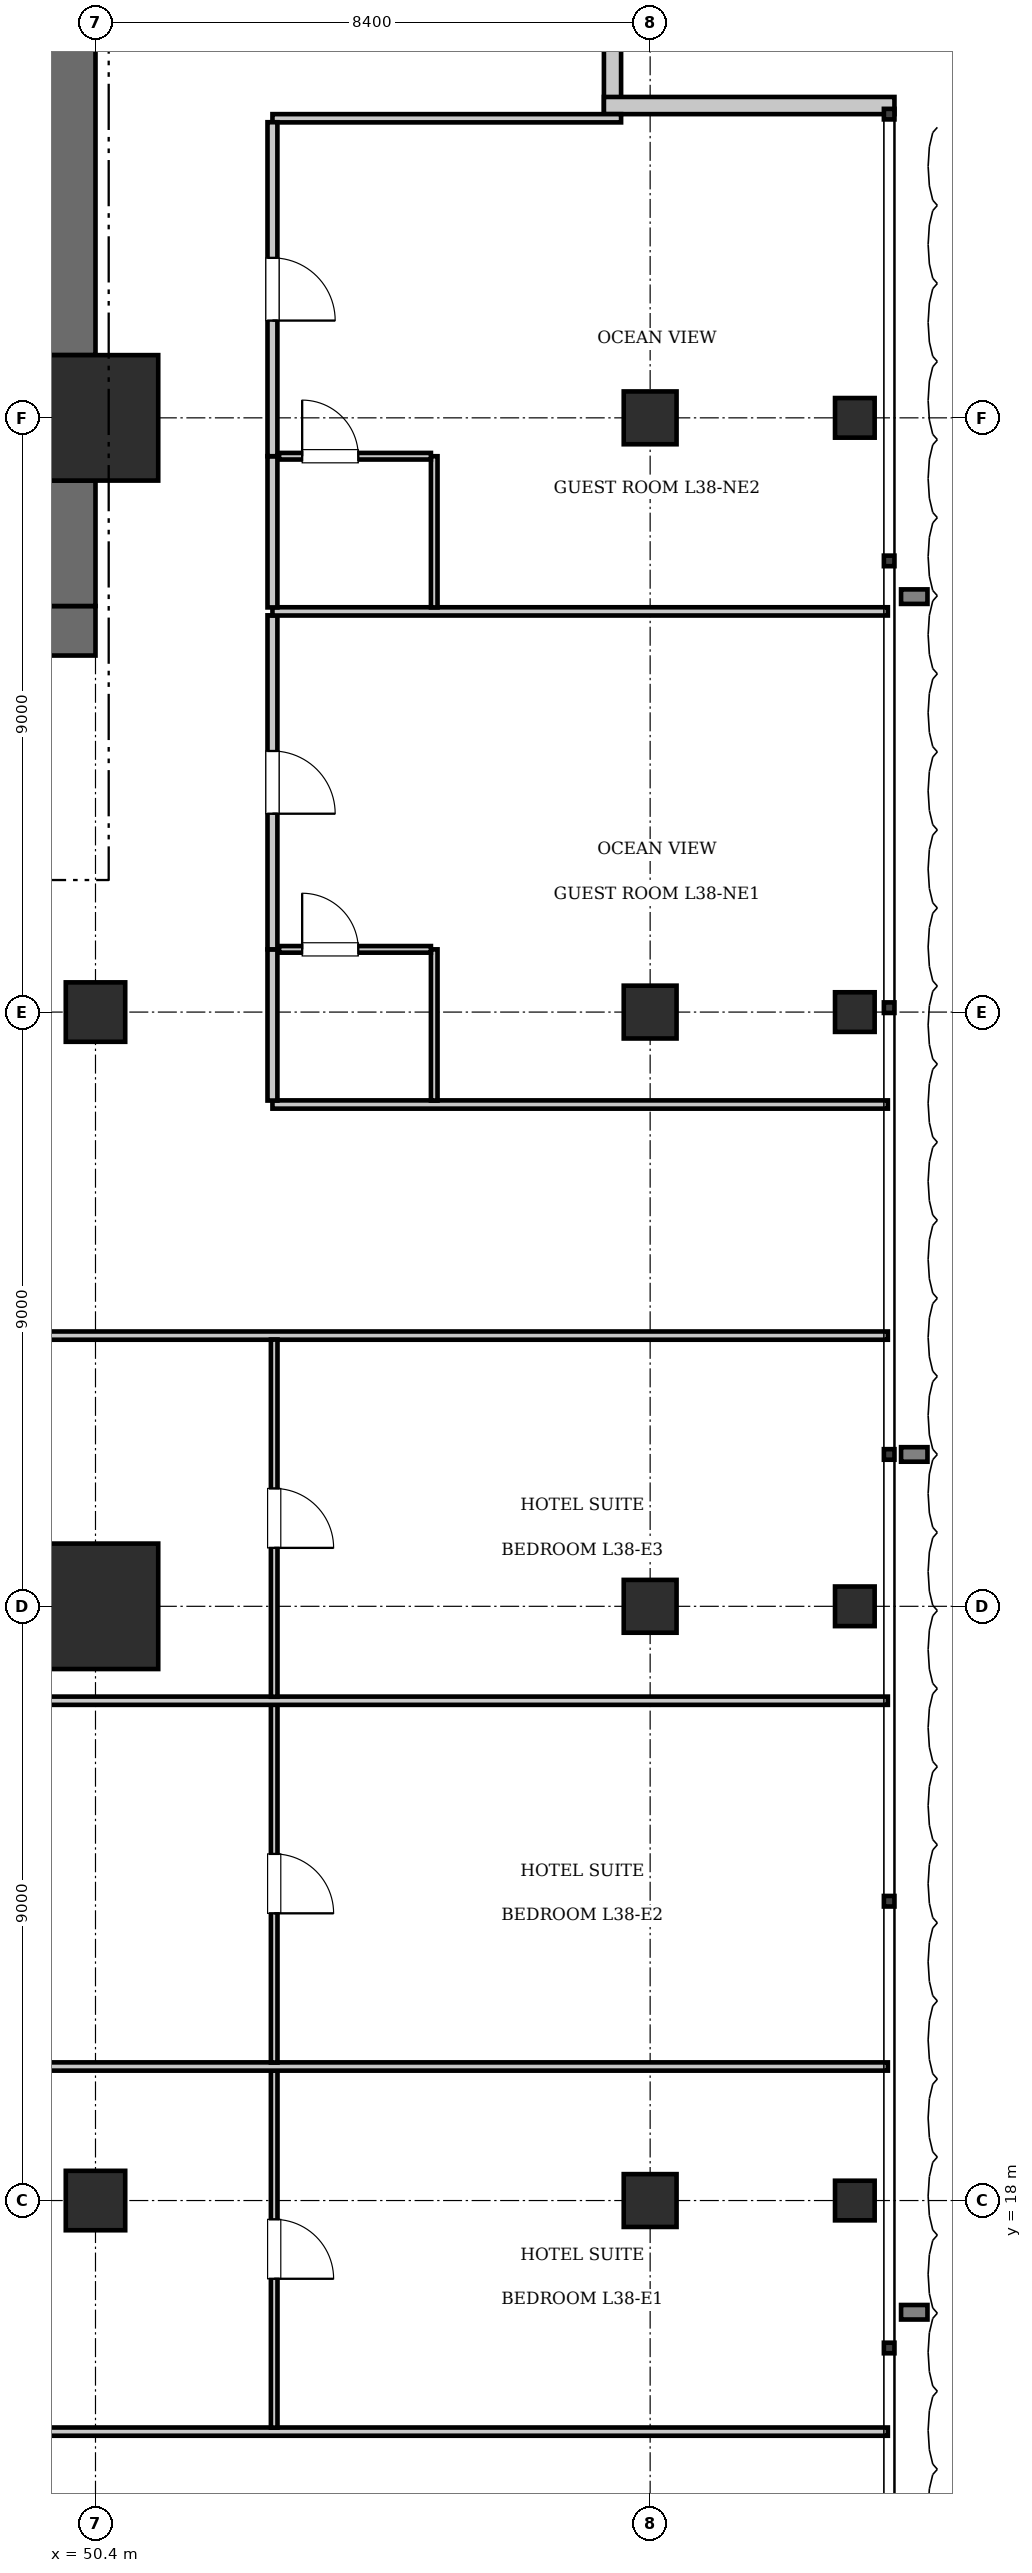
"""IFC4 building model, lengths in metres.
Left out: names, types, materials, properties, quantities, classifications, styles, units other than length and angle.
Written with IfcOpenShell. Run it as: python <this file> out.ifc"""

import sys

from ifc_helpers import new_model, si_unit, direction, frame, frame_2d, origin, origin_2d, place, context, subcontext, project, spatial, rectangle, i_section, extrude, element, fill, save


model = new_model("IFC4")
c1 = context("Model", 3, precision=1e-05, world=origin(), true_north=direction((0.0, 1.0)))
c2 = subcontext(c1, "Body", "Model", "MODEL_VIEW")
j1 = project(units=[si_unit("LENGTHUNIT", "METRE"), si_unit("PLANEANGLEUNIT", "RADIAN")], contexts=[c1])
p1 = place(None, origin())
s1 = spatial("IfcSite", under=j1, at=p1, CompositionType="ELEMENT")
p2 = place(p1, origin())
s2 = spatial("IfcBuilding", under=s1, at=p2, CompositionType="ELEMENT")
p3 = place(p2, frame((0.0, 0.0, 158.2)))
s3 = spatial("IfcBuildingStorey", under=s2, at=p3, CompositionType="ELEMENT", Elevation=158.2)
for number, where, z_axis, x_axis in (
    (1, (50.4, 27.0, 0.0), (0.0, 0.0, 1.0), (1.0, 0.0, 0.0)),
    (2, (50.4, 45.0, 0.0), (0.0, 0.0, 1.0), (1.0, 0.0, 0.0)),
):
    element("IfcColumn", number, at=place(p3, frame(where, z_axis=z_axis, x_axis=x_axis)), inside=s3, PredefinedType="COLUMN", context=c2, shape_type="SweptSolid", body=[
        extrude(rectangle(XDim=1.9, YDim=1.9, at=origin_2d()), origin(), (0.0, 0.0, 1.0), 3.85),
    ])
p4 = place(p3, frame((43.6, 41.775, 0.0), z_axis=(0.0, 0.0, 1.0), x_axis=(1.0, 0.0, 0.0)))
e3 = element("IfcWall", 3, at=p4, inside=s3, PredefinedType="SHEAR", context=c2, shape_type="SweptSolid", body=[
    extrude(rectangle(XDim=6.8, YDim=0.75, at=frame_2d((3.4, 0.0))), origin(), (0.0, 0.0, 1.0), 3.85),
])
p5 = place(p4, frame((3.9, 0.0, 0.0)))
e4 = element("IfcOpeningElement", 4, at=p5, cuts=e3, PredefinedType="OPENING", context=c2, shape_type="SweptSolid", body=[
    extrude(rectangle(XDim=1.15, YDim=2.15, at=frame_2d((0.575, 1.075))), frame((0.0, 0.385, 0.0), z_axis=(0.0, -1.0, 0.0), x_axis=(1.0, 0.0, 0.0)), (0.0, 0.0, 1.0), 0.77),
])
p6 = place(p4, frame((0.55, 0.0, 0.0)))
e5 = element("IfcOpeningElement", 5, at=p6, cuts=e3, PredefinedType="OPENING", context=c2, shape_type="SweptSolid", body=[
    extrude(rectangle(XDim=1.1, YDim=2.2, at=frame_2d((0.55, 1.1))), frame((0.0, 0.385, 0.0), z_axis=(0.0, -1.0, 0.0), x_axis=(1.0, 0.0, 0.0)), (0.0, 0.0, 1.0), 0.77),
])
p7 = place(p3, frame((50.025, 42.15, 0.0), z_axis=(0.0, 0.0, 1.0), x_axis=(0.0, 1.0, 0.0)))
e6 = element("IfcWall", 6, at=p7, inside=s3, PredefinedType="SHEAR", context=c2, shape_type="SweptSolid", body=[
    extrude(rectangle(XDim=1.9, YDim=0.75, at=frame_2d((0.95, 0.0))), origin(), (0.0, 0.0, 1.0), 3.85),
])
p8 = place(p3, frame((50.025, 45.95, 0.0), z_axis=(0.0, 0.0, 1.0), x_axis=(0.0, 1.0, 0.0)))
e7 = element("IfcWall", 7, at=p8, inside=s3, PredefinedType="SHEAR", context=c2, shape_type="SweptSolid", body=[
    extrude(rectangle(XDim=7.3, YDim=0.75, at=frame_2d((3.65, 0.0))), origin(), (0.0, 0.0, 1.0), 3.85),
])
for number, where, z_axis, x_axis in (
    (8, (50.4, 36.0, 0.0), (0.0, 0.0, 1.0), (1.0, 0.0, 0.0)),
    (9, (50.4, 18.0, 0.0), (0.0, 0.0, 1.0), (1.0, 0.0, 0.0)),
):
    element("IfcColumn", number, at=place(p3, frame(where, z_axis=z_axis, x_axis=x_axis)), inside=s3, PredefinedType="COLUMN", context=c2, shape_type="SweptSolid", body=[
        extrude(rectangle(XDim=0.9, YDim=0.9, at=origin_2d()), origin(), (0.0, 0.0, 1.0), 3.85),
    ])
for number, where, z_axis, x_axis in (
    (10, (58.8, 18.0, 0.0), (0.0, 0.0, 1.0), (1.0, 0.0, 0.0)),
    (11, (58.8, 27.0, 0.0), (0.0, 0.0, 1.0), (1.0, 0.0, 0.0)),
    (12, (58.8, 36.0, 0.0), (0.0, 0.0, 1.0), (1.0, 0.0, 0.0)),
    (13, (58.8, 45.0, 0.0), (0.0, 0.0, 1.0), (1.0, 0.0, 0.0)),
):
    element("IfcColumn", number, at=place(p3, frame(where, z_axis=z_axis, x_axis=x_axis)), inside=s3, PredefinedType="COLUMN", context=c2, shape_type="SweptSolid", body=[
        extrude(rectangle(XDim=0.8, YDim=0.8, at=origin_2d()), origin(), (0.0, 0.0, 1.0), 3.85),
    ])
for number, where, z_axis, x_axis in (
    (14, (61.9, 18.0, 0.0), (0.0, 0.0, 1.0), (1.0, 0.0, 0.0)),
    (15, (61.9, 27.0, 0.0), (0.0, 0.0, 1.0), (1.0, 0.0, 0.0)),
    (16, (61.9, 36.0, 0.0), (0.0, 0.0, 1.0), (1.0, 0.0, 0.0)),
    (17, (61.9, 45.0, 0.0), (0.0, 0.0, 1.0), (1.0, 0.0, 0.0)),
):
    element("IfcColumn", number, at=place(p3, frame(where, z_axis=z_axis, x_axis=x_axis)), inside=s3, PredefinedType="COLUMN", context=c2, shape_type="SweptSolid", body=[
        extrude(i_section(OverallWidth=0.6, OverallDepth=0.6, WebThickness=0.025, FlangeThickness=0.038, at=origin_2d()), origin(), (0.0, 0.0, 1.0), 3.85),
    ])
for number, where, z_axis, x_axis in (
    (18, (58.23, 54.0, 0.0), (0.0, 0.0, 1.0), (0.0, -1.0, 0.0)),
    (19, (58.1, 49.73, 0.0), (0.0, 0.0, 1.0), (1.0, 0.0, 0.0)),
):
    element("IfcWall", number, at=place(p3, frame(where, z_axis=z_axis, x_axis=x_axis)), inside=s3, PredefinedType="SOLIDWALL", context=c2, shape_type="SweptSolid", body=[
        extrude(rectangle(XDim=4.4, YDim=0.26, at=frame_2d((2.2, 0.0))), origin(), (0.0, 0.0, 1.0), 3.61),
    ])
for number, where, z_axis, x_axis in (
    (20, (40.48, 14.5, 0.0), (0.0, 0.0, 1.0), (1.0, 0.0, 0.0)),
    (21, (40.48, 31.1, 0.0), (0.0, 0.0, 1.0), (1.0, 0.0, 0.0)),
):
    element("IfcWall", number, at=place(p3, frame(where, z_axis=z_axis, x_axis=x_axis)), inside=s3, PredefinedType="PARTITIONING", context=c2, shape_type="SweptSolid", body=[
        extrude(rectangle(XDim=21.92, YDim=0.125, at=frame_2d((10.96, 0.0))), origin(), (0.0, 0.0, 1.0), 3.61),
    ])
p9 = place(p3, frame((53.106, 14.56, 0.0), z_axis=(0.0, 0.0, 1.0), x_axis=(0.0, 1.0, 0.0)))
e22 = element("IfcWall", 22, at=p9, inside=s3, PredefinedType="PARTITIONING", context=c2, shape_type="SweptSolid", body=[
    extrude(rectangle(XDim=5.41, YDim=0.1, at=frame_2d((2.705, 0.0))), origin(), (0.0, 0.0, 1.0), 3.61),
])
p10 = place(p9, frame((2.255, 0.0, 0.0)))
e23 = element("IfcOpeningElement", 23, at=p10, cuts=e22, PredefinedType="OPENING", context=c2, shape_type="SweptSolid", body=[
    extrude(rectangle(XDim=0.9, YDim=2.1, at=frame_2d((0.45, 1.05))), frame((0.0, 0.06, 0.0), z_axis=(0.0, -1.0, 0.0), x_axis=(1.0, 0.0, 0.0)), (0.0, 0.0, 1.0), 0.12),
])
p11 = place(p3, frame((40.48, 20.03, 0.0), z_axis=(0.0, 0.0, 1.0), x_axis=(1.0, 0.0, 0.0)))
e24 = element("IfcWall", 24, at=p11, inside=s3, PredefinedType="PARTITIONING", context=c2, shape_type="SweptSolid", body=[
    extrude(rectangle(XDim=21.92, YDim=0.125, at=frame_2d((10.96, 0.0))), origin(), (0.0, 0.0, 1.0), 3.61),
])
p12 = place(p3, frame((53.106, 20.09, 0.0), z_axis=(0.0, 0.0, 1.0), x_axis=(0.0, 1.0, 0.0)))
e25 = element("IfcWall", 25, at=p12, inside=s3, PredefinedType="PARTITIONING", context=c2, shape_type="SweptSolid", body=[
    extrude(rectangle(XDim=5.42, YDim=0.1, at=frame_2d((2.71, 0.0))), origin(), (0.0, 0.0, 1.0), 3.61),
])
p13 = place(p12, frame((2.26, 0.0, 0.0)))
e26 = element("IfcOpeningElement", 26, at=p13, cuts=e25, PredefinedType="OPENING", context=c2, shape_type="SweptSolid", body=[
    extrude(rectangle(XDim=0.9, YDim=2.1, at=frame_2d((0.45, 1.05))), frame((0.0, 0.06, 0.0), z_axis=(0.0, -1.0, 0.0), x_axis=(1.0, 0.0, 0.0)), (0.0, 0.0, 1.0), 0.12),
])
p14 = place(p3, frame((40.48, 25.57, 0.0), z_axis=(0.0, 0.0, 1.0), x_axis=(1.0, 0.0, 0.0)))
e27 = element("IfcWall", 27, at=p14, inside=s3, PredefinedType="PARTITIONING", context=c2, shape_type="SweptSolid", body=[
    extrude(rectangle(XDim=21.92, YDim=0.125, at=frame_2d((10.96, 0.0))), origin(), (0.0, 0.0, 1.0), 3.61),
])
p15 = place(p3, frame((53.106, 25.63, 0.0), z_axis=(0.0, 0.0, 1.0), x_axis=(0.0, 1.0, 0.0)))
e28 = element("IfcWall", 28, at=p15, inside=s3, PredefinedType="PARTITIONING", context=c2, shape_type="SweptSolid", body=[
    extrude(rectangle(XDim=5.41, YDim=0.1, at=frame_2d((2.705, 0.0))), origin(), (0.0, 0.0, 1.0), 3.61),
])
p16 = place(p15, frame((2.255, 0.0, 0.0)))
e29 = element("IfcOpeningElement", 29, at=p16, cuts=e28, PredefinedType="OPENING", context=c2, shape_type="SweptSolid", body=[
    extrude(rectangle(XDim=0.9, YDim=2.1, at=frame_2d((0.45, 1.05))), frame((0.0, 0.06, 0.0), z_axis=(0.0, -1.0, 0.0), x_axis=(1.0, 0.0, 0.0)), (0.0, 0.0, 1.0), 0.12),
])
p17 = place(p3, frame((53.08, 34.6, 0.0), z_axis=(0.0, 0.0, 1.0), x_axis=(1.0, 0.0, 0.0)))
e30 = element("IfcWall", 30, at=p17, inside=s3, PredefinedType="PARTITIONING", context=c2, shape_type="SweptSolid", body=[
    extrude(rectangle(XDim=9.32, YDim=0.125, at=frame_2d((4.66, 0.0))), origin(), (0.0, 0.0, 1.0), 3.61),
])
p18 = place(p3, frame((53.08, 49.538, 0.0), z_axis=(0.0, 0.0, 1.0), x_axis=(1.0, 0.0, 0.0)))
e31 = element("IfcWall", 31, at=p18, inside=s3, PredefinedType="PARTITIONING", context=c2, shape_type="SweptSolid", body=[
    extrude(rectangle(XDim=5.28, YDim=0.125, at=frame_2d((2.64, 0.0))), origin(), (0.0, 0.0, 1.0), 3.61),
])
p19 = place(p3, frame((53.08, 34.66, 0.0), z_axis=(0.0, 0.0, 1.0), x_axis=(0.0, 1.0, 0.0)))
e32 = element("IfcWall", 32, at=p19, inside=s3, PredefinedType="PARTITIONING", context=c2, shape_type="SweptSolid", body=[
    extrude(rectangle(XDim=2.29, YDim=0.15, at=frame_2d((1.145, 0.0))), origin(), (0.0, 0.0, 1.0), 3.61),
])
p20 = place(p3, frame((53.08, 36.95, 0.0), z_axis=(0.0, 0.0, 1.0), x_axis=(0.0, 1.0, 0.0)))
e33 = element("IfcWall", 33, at=p20, inside=s3, PredefinedType="PARTITIONING", context=c2, shape_type="SweptSolid", body=[
    extrude(rectangle(XDim=5.059, YDim=0.15, at=frame_2d((2.529, 0.0))), origin(), (0.0, 0.0, 1.0), 3.61),
])
p21 = place(p20, frame((2.054, 0.0, 0.0)))
e34 = element("IfcOpeningElement", 34, at=p21, cuts=e33, PredefinedType="OPENING", context=c2, shape_type="SweptSolid", body=[
    extrude(rectangle(XDim=0.95, YDim=2.15, at=frame_2d((0.475, 1.075))), frame((0.0, 0.085, 0.0), z_axis=(0.0, -1.0, 0.0), x_axis=(1.0, 0.0, 0.0)), (0.0, 0.0, 1.0), 0.17),
])
p22 = place(p3, frame((55.53, 34.66, 0.0), z_axis=(0.0, 0.0, 1.0), x_axis=(0.0, 1.0, 0.0)))
e35 = element("IfcWall", 35, at=p22, inside=s3, PredefinedType="PARTITIONING", context=c2, shape_type="SweptSolid", body=[
    extrude(rectangle(XDim=2.29, YDim=0.1, at=frame_2d((1.145, 0.0))), origin(), (0.0, 0.0, 1.0), 3.61),
])
p23 = place(p3, frame((53.18, 36.95, 0.0), z_axis=(0.0, 0.0, 1.0), x_axis=(1.0, 0.0, 0.0)))
e36 = element("IfcWall", 36, at=p23, inside=s3, PredefinedType="PARTITIONING", context=c2, shape_type="SweptSolid", body=[
    extrude(rectangle(XDim=2.3, YDim=0.1, at=frame_2d((1.15, 0.0))), origin(), (0.0, 0.0, 1.0), 3.61),
])
p24 = place(p23, frame((0.35, 0.0, 0.0)))
e37 = element("IfcOpeningElement", 37, at=p24, cuts=e36, PredefinedType="OPENING", context=c2, shape_type="SweptSolid", body=[
    extrude(rectangle(XDim=0.85, YDim=2.1, at=frame_2d((0.425, 1.05))), frame((0.0, 0.06, 0.0), z_axis=(0.0, -1.0, 0.0), x_axis=(1.0, 0.0, 0.0)), (0.0, 0.0, 1.0), 0.12),
])
p25 = place(p3, frame((53.08, 42.069, 0.0), z_axis=(0.0, 0.0, 1.0), x_axis=(1.0, 0.0, 0.0)))
e38 = element("IfcWall", 38, at=p25, inside=s3, PredefinedType="PARTITIONING", context=c2, shape_type="SweptSolid", body=[
    extrude(rectangle(XDim=9.32, YDim=0.125, at=frame_2d((4.66, 0.0))), origin(), (0.0, 0.0, 1.0), 3.61),
])
p26 = place(p3, frame((53.08, 42.129, 0.0), z_axis=(0.0, 0.0, 1.0), x_axis=(0.0, 1.0, 0.0)))
e39 = element("IfcWall", 39, at=p26, inside=s3, PredefinedType="PARTITIONING", context=c2, shape_type="SweptSolid", body=[
    extrude(rectangle(XDim=2.29, YDim=0.15, at=frame_2d((1.145, 0.0))), origin(), (0.0, 0.0, 1.0), 3.61),
])
p27 = place(p3, frame((53.08, 44.419, 0.0), z_axis=(0.0, 0.0, 1.0), x_axis=(0.0, 1.0, 0.0)))
e40 = element("IfcWall", 40, at=p27, inside=s3, PredefinedType="PARTITIONING", context=c2, shape_type="SweptSolid", body=[
    extrude(rectangle(XDim=5.059, YDim=0.15, at=frame_2d((2.529, 0.0))), origin(), (0.0, 0.0, 1.0), 3.61),
])
p28 = place(p27, frame((2.054, 0.0, 0.0)))
e41 = element("IfcOpeningElement", 41, at=p28, cuts=e40, PredefinedType="OPENING", context=c2, shape_type="SweptSolid", body=[
    extrude(rectangle(XDim=0.95, YDim=2.15, at=frame_2d((0.475, 1.075))), frame((0.0, 0.085, 0.0), z_axis=(0.0, -1.0, 0.0), x_axis=(1.0, 0.0, 0.0)), (0.0, 0.0, 1.0), 0.17),
])
p29 = place(p3, frame((55.53, 42.129, 0.0), z_axis=(0.0, 0.0, 1.0), x_axis=(0.0, 1.0, 0.0)))
e42 = element("IfcWall", 42, at=p29, inside=s3, PredefinedType="PARTITIONING", context=c2, shape_type="SweptSolid", body=[
    extrude(rectangle(XDim=2.29, YDim=0.1, at=frame_2d((1.145, 0.0))), origin(), (0.0, 0.0, 1.0), 3.61),
])
p30 = place(p3, frame((53.18, 44.419, 0.0), z_axis=(0.0, 0.0, 1.0), x_axis=(1.0, 0.0, 0.0)))
e43 = element("IfcWall", 43, at=p30, inside=s3, PredefinedType="PARTITIONING", context=c2, shape_type="SweptSolid", body=[
    extrude(rectangle(XDim=2.3, YDim=0.1, at=frame_2d((1.15, 0.0))), origin(), (0.0, 0.0, 1.0), 3.61),
])
p31 = place(p30, frame((0.35, 0.0, 0.0)))
e44 = element("IfcOpeningElement", 44, at=p31, cuts=e43, PredefinedType="OPENING", context=c2, shape_type="SweptSolid", body=[
    extrude(rectangle(XDim=0.85, YDim=2.1, at=frame_2d((0.425, 1.05))), frame((0.0, 0.06, 0.0), z_axis=(0.0, -1.0, 0.0), x_axis=(1.0, 0.0, 0.0)), (0.0, 0.0, 1.0), 0.12),
])
p32 = place(p10, frame((0.9, 0.0, 0.0), z_axis=(0.0, 0.0, 1.0), x_axis=(-1.0, 0.0, 0.0)))
e45 = element("IfcDoor", 45, at=p32, inside=s3, OperationType="SINGLE_SWING_RIGHT", PredefinedType="DOOR", context=c2, shape_type="SweptSolid", body=[
    extrude(rectangle(XDim=0.9, YDim=2.1, at=frame_2d((0.45, 1.05))), frame((0.0, 0.025, 0.0), z_axis=(0.0, -1.0, 0.0), x_axis=(1.0, 0.0, 0.0)), (0.0, 0.0, 1.0), 0.05),
])
fill(e23, e45)
p33 = place(p13, frame((0.9, 0.0, 0.0), z_axis=(0.0, 0.0, 1.0), x_axis=(-1.0, 0.0, 0.0)))
e46 = element("IfcDoor", 46, at=p33, inside=s3, OperationType="SINGLE_SWING_RIGHT", PredefinedType="DOOR", context=c2, shape_type="SweptSolid", body=[
    extrude(rectangle(XDim=0.9, YDim=2.1, at=frame_2d((0.45, 1.05))), frame((0.0, 0.025, 0.0), z_axis=(0.0, -1.0, 0.0), x_axis=(1.0, 0.0, 0.0)), (0.0, 0.0, 1.0), 0.05),
])
fill(e26, e46)
p34 = place(p16, frame((0.9, 0.0, 0.0), z_axis=(0.0, 0.0, 1.0), x_axis=(-1.0, 0.0, 0.0)))
e47 = element("IfcDoor", 47, at=p34, inside=s3, OperationType="SINGLE_SWING_RIGHT", PredefinedType="DOOR", context=c2, shape_type="SweptSolid", body=[
    extrude(rectangle(XDim=0.9, YDim=2.1, at=frame_2d((0.45, 1.05))), frame((0.0, 0.025, 0.0), z_axis=(0.0, -1.0, 0.0), x_axis=(1.0, 0.0, 0.0)), (0.0, 0.0, 1.0), 0.05),
])
fill(e29, e47)
p35 = place(p24, origin())
e48 = element("IfcDoor", 48, at=p35, inside=s3, OperationType="SINGLE_SWING_LEFT", PredefinedType="DOOR", context=c2, shape_type="SweptSolid", body=[
    extrude(rectangle(XDim=0.85, YDim=2.1, at=frame_2d((0.425, 1.05))), frame((0.0, 0.025, 0.0), z_axis=(0.0, -1.0, 0.0), x_axis=(1.0, 0.0, 0.0)), (0.0, 0.0, 1.0), 0.05),
])
fill(e37, e48)
p36 = place(p21, frame((0.95, 0.0, 0.0), z_axis=(0.0, 0.0, 1.0), x_axis=(-1.0, 0.0, 0.0)))
e49 = element("IfcDoor", 49, at=p36, inside=s3, OperationType="SINGLE_SWING_RIGHT", PredefinedType="DOOR", context=c2, shape_type="SweptSolid", body=[
    extrude(rectangle(XDim=0.95, YDim=2.15, at=frame_2d((0.475, 1.075))), frame((0.0, 0.025, 0.0), z_axis=(0.0, -1.0, 0.0), x_axis=(1.0, 0.0, 0.0)), (0.0, 0.0, 1.0), 0.05),
])
fill(e34, e49)
p37 = place(p31, origin())
e50 = element("IfcDoor", 50, at=p37, inside=s3, OperationType="SINGLE_SWING_LEFT", PredefinedType="DOOR", context=c2, shape_type="SweptSolid", body=[
    extrude(rectangle(XDim=0.85, YDim=2.1, at=frame_2d((0.425, 1.05))), frame((0.0, 0.025, 0.0), z_axis=(0.0, -1.0, 0.0), x_axis=(1.0, 0.0, 0.0)), (0.0, 0.0, 1.0), 0.05),
])
fill(e44, e50)
p38 = place(p28, frame((0.95, 0.0, 0.0), z_axis=(0.0, 0.0, 1.0), x_axis=(-1.0, 0.0, 0.0)))
e51 = element("IfcDoor", 51, at=p38, inside=s3, OperationType="SINGLE_SWING_RIGHT", PredefinedType="DOOR", context=c2, shape_type="SweptSolid", body=[
    extrude(rectangle(XDim=0.95, YDim=2.15, at=frame_2d((0.475, 1.075))), frame((0.0, 0.025, 0.0), z_axis=(0.0, -1.0, 0.0), x_axis=(1.0, 0.0, 0.0)), (0.0, 0.0, 1.0), 0.05),
])
fill(e41, e51)
save(model, sys.argv[1])
